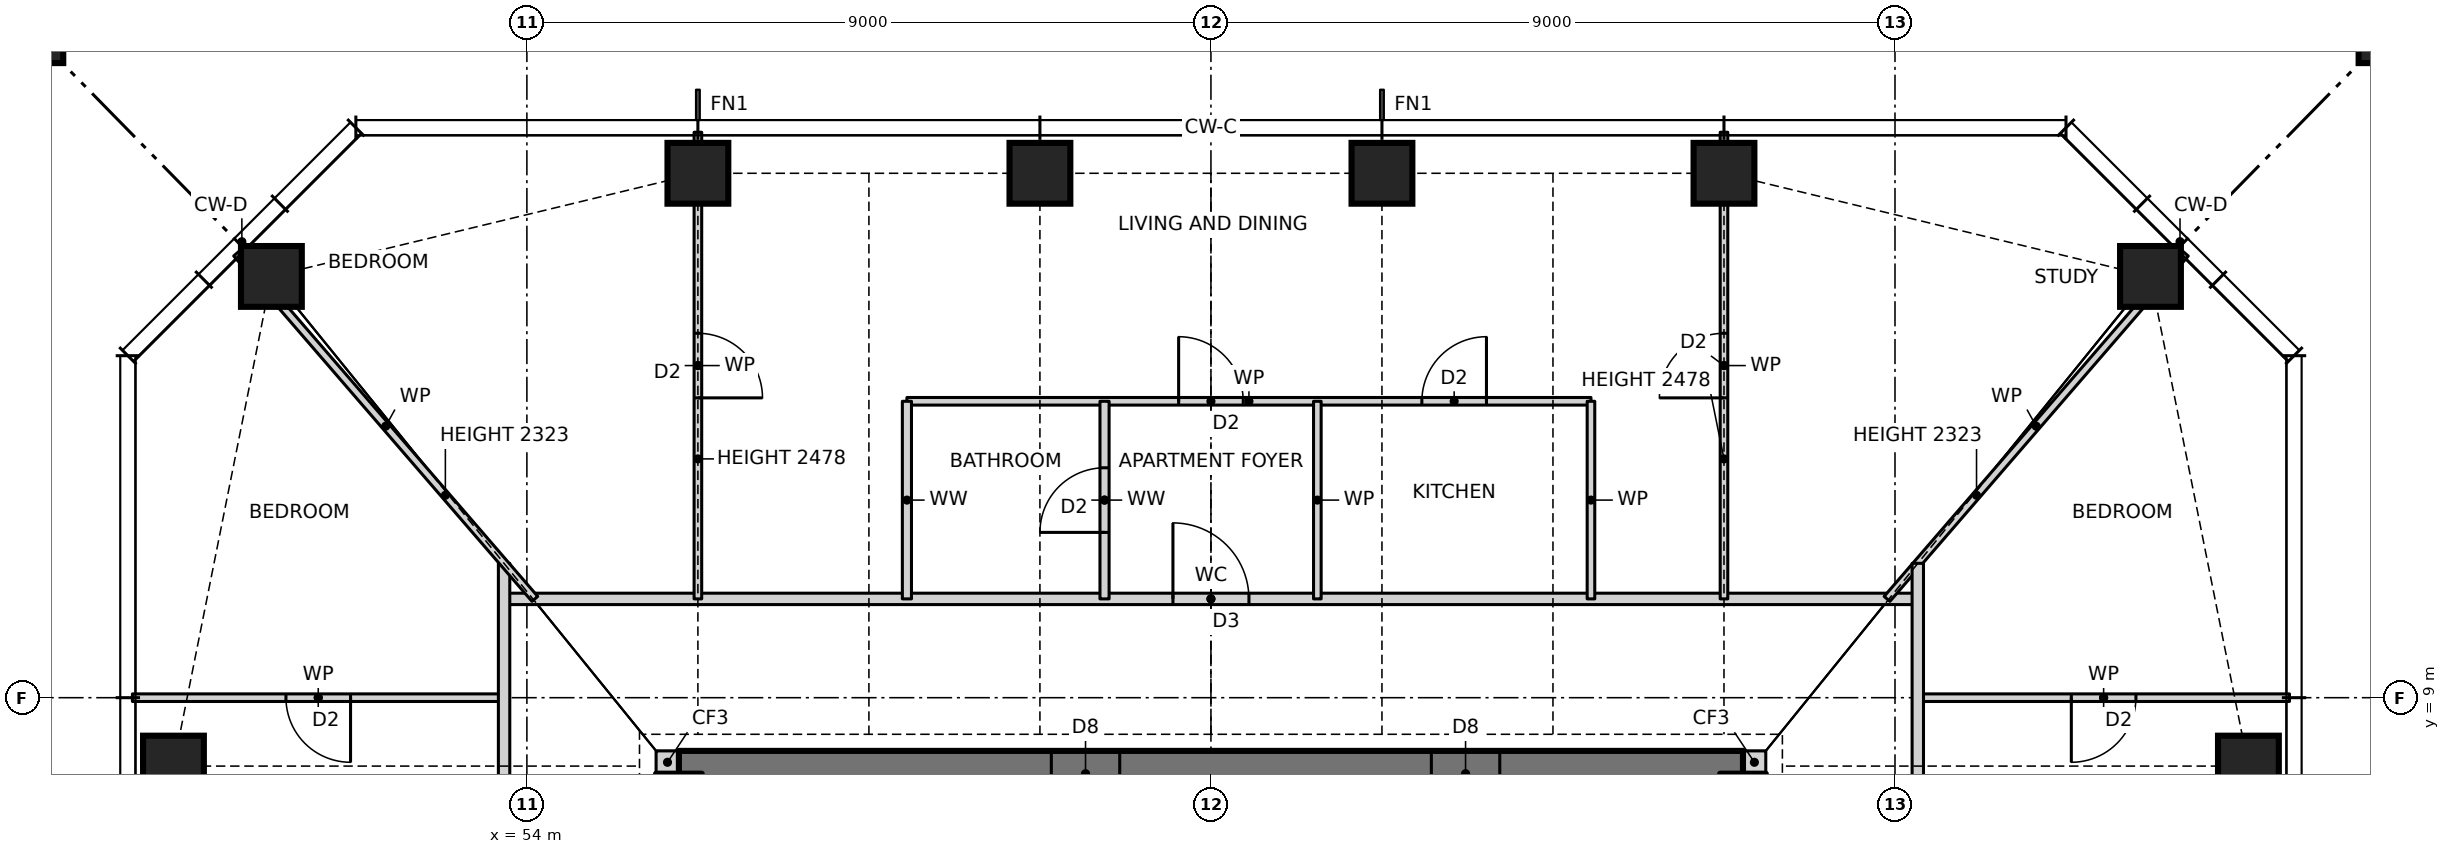
"""IFC4 building model, lengths in metres.
Left out: names, types, materials, properties, quantities, classifications, styles, units other than length and angle.
Written with IfcOpenShell. Run it as: python <this file> out.ifc"""

import sys

from ifc_helpers import new_model, si_unit, direction, frame, frame_2d, origin, origin_2d, place, context, subcontext, project, spatial, rectangle, hollow_rectangle, extrude, element, fill, save


model = new_model("IFC4")
c1 = context("Model", 3, precision=1e-05, world=origin(), true_north=direction((0.0, 1.0)))
c2 = subcontext(c1, "Body", "Model", "MODEL_VIEW")
j1 = project(units=[si_unit("LENGTHUNIT", "METRE"), si_unit("PLANEANGLEUNIT", "RADIAN")], contexts=[c1])
p1 = place(None, origin())
s1 = spatial("IfcSite", under=j1, at=p1, CompositionType="ELEMENT")
p2 = place(p1, origin())
s2 = spatial("IfcBuilding", under=s1, at=p2, CompositionType="ELEMENT")
p3 = place(p2, frame((0.0, 0.0, 126.0)))
s3 = spatial("IfcBuildingStorey", under=s2, at=p3, CompositionType="ELEMENT", Elevation=126.0)
for number, where, z_axis, x_axis in (
    (1, (76.65, 8.1, 0.0), (0.0, 0.0, 1.0), (1.0, 0.0, 0.0)),
    (2, (75.361, 14.543, 0.0), (0.0, 0.0, 1.0), (1.0, 0.0, 0.0)),
    (3, (69.75, 15.9, 0.0), (0.0, 0.0, 1.0), (1.0, 0.0, 0.0)),
    (4, (65.25, 15.9, 0.0), (0.0, 0.0, 1.0), (1.0, 0.0, 0.0)),
    (5, (60.75, 15.9, 0.0), (0.0, 0.0, 1.0), (1.0, 0.0, 0.0)),
    (6, (56.25, 15.9, 0.0), (0.0, 0.0, 1.0), (1.0, 0.0, 0.0)),
    (7, (50.639, 14.543, 0.0), (0.0, 0.0, 1.0), (1.0, 0.0, 0.0)),
    (8, (49.35, 8.1, 0.0), (0.0, 0.0, 1.0), (1.0, 0.0, 0.0)),
):
    element("IfcColumn", number, at=place(p3, frame(where, z_axis=z_axis, x_axis=x_axis)), inside=s3, PredefinedType="COLUMN", context=c2, shape_type="SweptSolid", body=[
        extrude(hollow_rectangle(XDim=0.8, YDim=0.8, WallThickness=0.1, at=origin_2d()), origin(), (0.0, 0.0, 1.0), 3.5),
    ])
for number, where, z_axis, x_axis in (
    (9, (78.65, 17.9, 0.0), (0.0, 0.0, 1.0), (1.0, 0.0, 0.0)),
    (10, (47.35, 17.9, 0.0), (0.0, 0.0, 1.0), (1.0, 0.0, 0.0)),
):
    element("IfcColumn", number, at=place(p3, frame(where, z_axis=z_axis, x_axis=x_axis)), inside=s3, PredefinedType="COLUMN", context=c2, shape_type="SweptSolid", body=[
        extrude(hollow_rectangle(XDim=1.1, YDim=1.1, WallThickness=0.06, at=origin_2d()), origin(), (0.0, 0.0, 1.0), 3.5),
    ])
for number, where, z_axis, x_axis in (
    (11, (70.0, 8.15, 0.0), (0.0, 0.0, 1.0), (1.0, 0.0, 0.0)),
    (12, (55.7, 8.15, 0.0), (0.0, 0.0, 1.0), (1.0, 0.0, 0.0)),
):
    element("IfcWall", number, at=place(p3, frame(where, z_axis=z_axis, x_axis=x_axis)), inside=s3, PredefinedType="SOLIDWALL", context=c2, shape_type="SweptSolid", body=[
        extrude(rectangle(XDim=0.3, YDim=0.3, at=frame_2d((0.15, 0.0))), origin(), (0.0, 0.0, 1.0), 3.5),
    ])
p4 = place(p3, frame((70.0, 8.0, 0.0), z_axis=(0.0, 0.0, 1.0), x_axis=(-1.0, 0.0, 0.0)))
e13 = element("IfcWall", 13, at=p4, inside=s3, PredefinedType="SHEAR", context=c2, shape_type="SweptSolid", body=[
    extrude(rectangle(XDim=14.0, YDim=0.6, at=frame_2d((7.0, 0.0))), origin(), (0.0, 0.0, 1.0), 3.5),
])
p5 = place(p4, frame((8.2, 0.0, 0.0)))
e14 = element("IfcOpeningElement", 14, at=p5, cuts=e13, PredefinedType="OPENING", context=c2, shape_type="SweptSolid", body=[
    extrude(rectangle(XDim=0.9, YDim=2.1, at=frame_2d((0.45, 1.05))), frame((0.0, 0.31, 0.0), z_axis=(0.0, -1.0, 0.0), x_axis=(1.0, 0.0, 0.0)), (0.0, 0.0, 1.0), 0.62),
])
p6 = place(p4, frame((3.2, 0.0, 0.0)))
e15 = element("IfcOpeningElement", 15, at=p6, cuts=e13, PredefinedType="OPENING", context=c2, shape_type="SweptSolid", body=[
    extrude(rectangle(XDim=0.9, YDim=2.1, at=frame_2d((0.45, 1.05))), frame((0.0, 0.31, 0.0), z_axis=(0.0, -1.0, 0.0), x_axis=(1.0, 0.0, 0.0)), (0.0, 0.0, 1.0), 0.62),
])
p7 = place(p3, frame((48.81, 9.0, 0.0), z_axis=(0.0, 0.0, 1.0), x_axis=(1.0, 0.0, 0.0)))
e16 = element("IfcWall", 16, at=p7, inside=s3, PredefinedType="PARTITIONING", context=c2, shape_type="SweptSolid", body=[
    extrude(rectangle(XDim=4.89, YDim=0.1, at=frame_2d((2.445, 0.0))), origin(), (0.0, 0.0, 1.0), 3.25),
])
p8 = place(p7, frame((2.02, 0.0, 0.0)))
e17 = element("IfcOpeningElement", 17, at=p8, cuts=e16, PredefinedType="OPENING", context=c2, shape_type="SweptSolid", body=[
    extrude(rectangle(XDim=0.85, YDim=2.1, at=frame_2d((0.425, 1.05))), frame((0.0, 0.06, 0.0), z_axis=(0.0, -1.0, 0.0), x_axis=(1.0, 0.0, 0.0)), (0.0, 0.0, 1.0), 0.12),
])
p9 = place(p3, frame((72.3, 9.0, 0.0), z_axis=(0.0, 0.0, 1.0), x_axis=(1.0, 0.0, 0.0)))
e18 = element("IfcWall", 18, at=p9, inside=s3, PredefinedType="PARTITIONING", context=c2, shape_type="SweptSolid", body=[
    extrude(rectangle(XDim=4.89, YDim=0.1, at=frame_2d((2.445, 0.0))), origin(), (0.0, 0.0, 1.0), 3.25),
])
p10 = place(p9, frame((2.02, 0.0, 0.0)))
e19 = element("IfcOpeningElement", 19, at=p10, cuts=e18, PredefinedType="OPENING", context=c2, shape_type="SweptSolid", body=[
    extrude(rectangle(XDim=0.85, YDim=2.1, at=frame_2d((0.425, 1.05))), frame((0.0, 0.06, 0.0), z_axis=(0.0, -1.0, 0.0), x_axis=(1.0, 0.0, 0.0)), (0.0, 0.0, 1.0), 0.12),
])
p11 = place(p3, frame((53.7, 10.3, 0.0), z_axis=(0.0, 0.0, 1.0), x_axis=(1.0, 0.0, 0.0)))
e20 = element("IfcWall", 20, at=p11, inside=s3, PredefinedType="PARTITIONING", context=c2, shape_type="SweptSolid", body=[
    extrude(rectangle(XDim=18.6, YDim=0.15, at=frame_2d((9.3, 0.0))), origin(), (0.0, 0.0, 1.0), 3.25),
])
p12 = place(p11, frame((8.8, 0.0, 0.0)))
e21 = element("IfcOpeningElement", 21, at=p12, cuts=e20, PredefinedType="OPENING", context=c2, shape_type="SweptSolid", body=[
    extrude(rectangle(XDim=1.0, YDim=2.1, at=frame_2d((0.5, 1.05))), frame((0.0, 0.085, 0.0), z_axis=(0.0, -1.0, 0.0), x_axis=(1.0, 0.0, 0.0)), (0.0, 0.0, 1.0), 0.17),
])
p13 = place(p3, frame((59.0, 12.9, 0.0), z_axis=(0.0, 0.0, 1.0), x_axis=(1.0, 0.0, 0.0)))
e22 = element("IfcWall", 22, at=p13, inside=s3, PredefinedType="PARTITIONING", context=c2, shape_type="SweptSolid", body=[
    extrude(rectangle(XDim=9.0, YDim=0.1, at=frame_2d((4.5, 0.0))), origin(), (0.0, 0.0, 1.0), 3.25),
])
p14 = place(p13, frame((6.775, 0.0, 0.0)))
e23 = element("IfcOpeningElement", 23, at=p14, cuts=e22, PredefinedType="OPENING", context=c2, shape_type="SweptSolid", body=[
    extrude(rectangle(XDim=0.85, YDim=2.1, at=frame_2d((0.425, 1.05))), frame((0.0, 0.06, 0.0), z_axis=(0.0, -1.0, 0.0), x_axis=(1.0, 0.0, 0.0)), (0.0, 0.0, 1.0), 0.12),
])
p15 = place(p13, frame((3.575, 0.0, 0.0)))
e24 = element("IfcOpeningElement", 24, at=p15, cuts=e22, PredefinedType="OPENING", context=c2, shape_type="SweptSolid", body=[
    extrude(rectangle(XDim=0.85, YDim=2.1, at=frame_2d((0.425, 1.05))), frame((0.0, 0.06, 0.0), z_axis=(0.0, -1.0, 0.0), x_axis=(1.0, 0.0, 0.0)), (0.0, 0.0, 1.0), 0.12),
])
p16 = place(p3, frame((71.895, 10.3, 0.0), z_axis=(0.0, 0.0, 1.0), x_axis=(0.65378286253, 0.756682211144, 0.0)))
e25 = element("IfcWall", 25, at=p16, inside=s3, PredefinedType="PARTITIONING", context=c2, shape_type="SweptSolid", body=[
    extrude(rectangle(XDim=6.005, YDim=0.1, at=frame_2d((3.002, 0.0))), origin(), (0.0, 0.0, 1.0), 2.323),
])
p17 = place(p3, frame((72.3, -10.9, 0.0), z_axis=(0.0, 0.0, 1.0), x_axis=(0.0, 1.0, 0.0)))
e26 = element("IfcWall", 26, at=p17, inside=s3, PredefinedType="PARTITIONING", context=c2, shape_type="SweptSolid", body=[
    extrude(rectangle(XDim=21.668, YDim=0.15, at=frame_2d((10.834, 0.0))), origin(), (0.0, 0.0, 1.0), 3.25),
])
p18 = place(p17, frame((10.4, 0.0, 0.0)))
e27 = element("IfcOpeningElement", 27, at=p18, cuts=e26, PredefinedType="OPENING", context=c2, shape_type="SweptSolid", body=[
    extrude(rectangle(XDim=1.0, YDim=2.1, at=frame_2d((0.5, 1.05))), frame((0.0, 0.085, 0.0), z_axis=(0.0, -1.0, 0.0), x_axis=(1.0, 0.0, 0.0)), (0.0, 0.0, 1.0), 0.17),
])
p19 = place(p3, frame((69.75, 10.3, 0.0), z_axis=(0.0, 0.0, 1.0), x_axis=(0.0, 1.0, 0.0)))
e28 = element("IfcWall", 28, at=p19, inside=s3, PredefinedType="PARTITIONING", context=c2, shape_type="SweptSolid", body=[
    extrude(rectangle(XDim=6.14, YDim=0.1, at=frame_2d((3.07, 0.0))), origin(), (0.0, 0.0, 1.0), 2.478),
])
p20 = place(p19, frame((2.645, 0.0, 0.0)))
e29 = element("IfcOpeningElement", 29, at=p20, cuts=e28, PredefinedType="OPENING", context=c2, shape_type="SweptSolid", body=[
    extrude(rectangle(XDim=0.85, YDim=2.1, at=frame_2d((0.425, 1.05))), frame((0.0, 0.06, 0.0), z_axis=(0.0, -1.0, 0.0), x_axis=(1.0, 0.0, 0.0)), (0.0, 0.0, 1.0), 0.12),
])
for number, where, z_axis, x_axis in (
    (30, (68.0, 10.3, 0.0), (0.0, 0.0, 1.0), (0.0, 1.0, 0.0)),
    (31, (64.4, 10.3, 0.0), (0.0, 0.0, 1.0), (0.0, 1.0, 0.0)),
):
    element("IfcWall", number, at=place(p3, frame(where, z_axis=z_axis, x_axis=x_axis)), inside=s3, PredefinedType="PARTITIONING", context=c2, shape_type="SweptSolid", body=[
        extrude(rectangle(XDim=2.6, YDim=0.1, at=frame_2d((1.3, 0.0))), origin(), (0.0, 0.0, 1.0), 3.25),
    ])
p21 = place(p3, frame((61.6, 10.3, 0.0), z_axis=(0.0, 0.0, 1.0), x_axis=(0.0, 1.0, 0.0)))
e32 = element("IfcWall", 32, at=p21, inside=s3, PredefinedType="PARTITIONING", context=c2, shape_type="SweptSolid", body=[
    extrude(rectangle(XDim=2.6, YDim=0.12, at=frame_2d((1.3, 0.0))), origin(), (0.0, 0.0, 1.0), 3.25),
])
p22 = place(p21, frame((0.875, 0.0, 0.0)))
e33 = element("IfcOpeningElement", 33, at=p22, cuts=e32, PredefinedType="OPENING", context=c2, shape_type="SweptSolid", body=[
    extrude(rectangle(XDim=0.85, YDim=2.1, at=frame_2d((0.425, 1.05))), frame((0.0, 0.07, 0.0), z_axis=(0.0, -1.0, 0.0), x_axis=(1.0, 0.0, 0.0)), (0.0, 0.0, 1.0), 0.14),
])
p23 = place(p3, frame((59.0, 10.3, 0.0), z_axis=(0.0, 0.0, 1.0), x_axis=(0.0, 1.0, 0.0)))
e34 = element("IfcWall", 34, at=p23, inside=s3, PredefinedType="PARTITIONING", context=c2, shape_type="SweptSolid", body=[
    extrude(rectangle(XDim=2.6, YDim=0.12, at=frame_2d((1.3, 0.0))), origin(), (0.0, 0.0, 1.0), 3.25),
])
p24 = place(p3, frame((56.25, 10.3, 0.0), z_axis=(0.0, 0.0, 1.0), x_axis=(0.0, 1.0, 0.0)))
e35 = element("IfcWall", 35, at=p24, inside=s3, PredefinedType="PARTITIONING", context=c2, shape_type="SweptSolid", body=[
    extrude(rectangle(XDim=6.14, YDim=0.1, at=frame_2d((3.07, 0.0))), origin(), (0.0, 0.0, 1.0), 2.478),
])
p25 = place(p24, frame((2.645, 0.0, 0.0)))
e36 = element("IfcOpeningElement", 36, at=p25, cuts=e35, PredefinedType="OPENING", context=c2, shape_type="SweptSolid", body=[
    extrude(rectangle(XDim=0.85, YDim=2.1, at=frame_2d((0.425, 1.05))), frame((0.0, 0.06, 0.0), z_axis=(0.0, -1.0, 0.0), x_axis=(1.0, 0.0, 0.0)), (0.0, 0.0, 1.0), 0.12),
])
p26 = place(p3, frame((53.7, -10.9, 0.0), z_axis=(0.0, 0.0, 1.0), x_axis=(0.0, 1.0, 0.0)))
e37 = element("IfcWall", 37, at=p26, inside=s3, PredefinedType="PARTITIONING", context=c2, shape_type="SweptSolid", body=[
    extrude(rectangle(XDim=21.668, YDim=0.15, at=frame_2d((10.834, 0.0))), origin(), (0.0, 0.0, 1.0), 3.25),
])
p27 = place(p26, frame((10.4, 0.0, 0.0)))
e38 = element("IfcOpeningElement", 38, at=p27, cuts=e37, PredefinedType="OPENING", context=c2, shape_type="SweptSolid", body=[
    extrude(rectangle(XDim=1.0, YDim=2.1, at=frame_2d((0.5, 1.05))), frame((0.0, 0.085, 0.0), z_axis=(0.0, -1.0, 0.0), x_axis=(1.0, 0.0, 0.0)), (0.0, 0.0, 1.0), 0.17),
])
p28 = place(p3, frame((54.105, 10.3, 0.0), z_axis=(0.0, 0.0, 1.0), x_axis=(-0.653606109319, 0.756834892074, 0.0)))
e39 = element("IfcWall", 39, at=p28, inside=s3, PredefinedType="PARTITIONING", context=c2, shape_type="SweptSolid", body=[
    extrude(rectangle(XDim=6.005, YDim=0.1, at=frame_2d((3.002, 0.0))), origin(), (0.0, 0.0, 1.0), 2.323),
])
p29 = place(p10, frame((0.85, 0.0, 0.0), z_axis=(0.0, 0.0, 1.0), x_axis=(-1.0, 0.0, 0.0)))
e40 = element("IfcDoor", 40, at=p29, inside=s3, OperationType="SINGLE_SWING_RIGHT", PredefinedType="DOOR", context=c2, shape_type="SweptSolid", body=[
    extrude(rectangle(XDim=0.85, YDim=2.1, at=frame_2d((0.425, 1.05))), frame((0.0, 0.025, 0.0), z_axis=(0.0, -1.0, 0.0), x_axis=(1.0, 0.0, 0.0)), (0.0, 0.0, 1.0), 0.05),
])
fill(e19, e40)
p30 = place(p14, origin())
e41 = element("IfcDoor", 41, at=p30, inside=s3, OperationType="SINGLE_SWING_RIGHT", PredefinedType="DOOR", context=c2, shape_type="SweptSolid", body=[
    extrude(rectangle(XDim=0.85, YDim=2.1, at=frame_2d((0.425, 1.05))), frame((0.0, 0.025, 0.0), z_axis=(0.0, -1.0, 0.0), x_axis=(1.0, 0.0, 0.0)), (0.0, 0.0, 1.0), 0.05),
])
fill(e23, e41)
p31 = place(p12, origin())
e42 = element("IfcDoor", 42, at=p31, inside=s3, OperationType="SINGLE_SWING_LEFT", PredefinedType="DOOR", context=c2, shape_type="SweptSolid", body=[
    extrude(rectangle(XDim=1.0, YDim=2.1, at=frame_2d((0.5, 1.05))), frame((0.0, 0.025, 0.0), z_axis=(0.0, -1.0, 0.0), x_axis=(1.0, 0.0, 0.0)), (0.0, 0.0, 1.0), 0.05),
])
fill(e21, e42)
p32 = place(p15, origin())
e43 = element("IfcDoor", 43, at=p32, inside=s3, OperationType="SINGLE_SWING_LEFT", PredefinedType="DOOR", context=c2, shape_type="SweptSolid", body=[
    extrude(rectangle(XDim=0.85, YDim=2.1, at=frame_2d((0.425, 1.05))), frame((0.0, 0.025, 0.0), z_axis=(0.0, -1.0, 0.0), x_axis=(1.0, 0.0, 0.0)), (0.0, 0.0, 1.0), 0.05),
])
fill(e24, e43)
p33 = place(p22, origin())
e44 = element("IfcDoor", 44, at=p33, inside=s3, OperationType="SINGLE_SWING_LEFT", PredefinedType="DOOR", context=c2, shape_type="SweptSolid", body=[
    extrude(rectangle(XDim=0.85, YDim=2.1, at=frame_2d((0.425, 1.05))), frame((0.0, 0.025, 0.0), z_axis=(0.0, -1.0, 0.0), x_axis=(1.0, 0.0, 0.0)), (0.0, 0.0, 1.0), 0.05),
])
fill(e33, e44)
p34 = place(p20, origin())
e45 = element("IfcDoor", 45, at=p34, inside=s3, OperationType="SINGLE_SWING_LEFT", PredefinedType="DOOR", context=c2, shape_type="SweptSolid", body=[
    extrude(rectangle(XDim=0.85, YDim=2.1, at=frame_2d((0.425, 1.05))), frame((0.0, 0.025, 0.0), z_axis=(0.0, -1.0, 0.0), x_axis=(1.0, 0.0, 0.0)), (0.0, 0.0, 1.0), 0.05),
])
fill(e29, e45)
p35 = place(p25, frame((0.85, 0.0, 0.0), z_axis=(0.0, 0.0, 1.0), x_axis=(-1.0, 0.0, 0.0)))
e46 = element("IfcDoor", 46, at=p35, inside=s3, OperationType="SINGLE_SWING_RIGHT", PredefinedType="DOOR", context=c2, shape_type="SweptSolid", body=[
    extrude(rectangle(XDim=0.85, YDim=2.1, at=frame_2d((0.425, 1.05))), frame((0.0, 0.025, 0.0), z_axis=(0.0, -1.0, 0.0), x_axis=(1.0, 0.0, 0.0)), (0.0, 0.0, 1.0), 0.05),
])
fill(e36, e46)
p36 = place(p8, frame((0.85, 0.0, 0.0), z_axis=(0.0, 0.0, 1.0), x_axis=(-1.0, 0.0, 0.0)))
e47 = element("IfcDoor", 47, at=p36, inside=s3, OperationType="SINGLE_SWING_LEFT", PredefinedType="DOOR", context=c2, shape_type="SweptSolid", body=[
    extrude(rectangle(XDim=0.85, YDim=2.1, at=frame_2d((0.425, 1.05))), frame((0.0, 0.025, 0.0), z_axis=(0.0, -1.0, 0.0), x_axis=(1.0, 0.0, 0.0)), (0.0, 0.0, 1.0), 0.05),
])
fill(e17, e47)
p37 = place(p5, origin())
e48 = element("IfcDoor", 48, at=p37, inside=s3, OperationType="SINGLE_SWING_RIGHT", PredefinedType="DOOR", context=c2, shape_type="SweptSolid", body=[
    extrude(rectangle(XDim=0.9, YDim=2.1, at=frame_2d((0.45, 1.05))), frame((0.0, 0.025, 0.0), z_axis=(0.0, -1.0, 0.0), x_axis=(1.0, 0.0, 0.0)), (0.0, 0.0, 1.0), 0.05),
])
fill(e14, e48)
p38 = place(p6, origin())
e49 = element("IfcDoor", 49, at=p38, inside=s3, OperationType="SINGLE_SWING_RIGHT", PredefinedType="DOOR", context=c2, shape_type="SweptSolid", body=[
    extrude(rectangle(XDim=0.9, YDim=2.1, at=frame_2d((0.45, 1.05))), frame((0.0, 0.025, 0.0), z_axis=(0.0, -1.0, 0.0), x_axis=(1.0, 0.0, 0.0)), (0.0, 0.0, 1.0), 0.05),
])
fill(e15, e49)
save(model, sys.argv[1])
